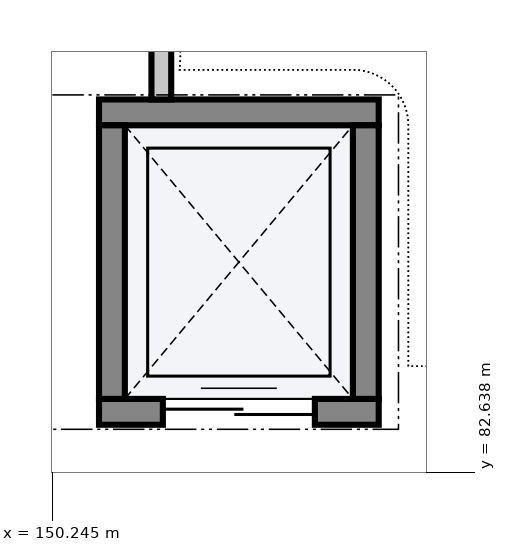
"""IFC4 building model, lengths in metres.
Left out: names, types, materials, properties, quantities, classifications, styles, units other than length and angle.
Written with IfcOpenShell. Run it as: python <this file> out.ifc"""

import sys

from ifc_helpers import new_model, si_unit, direction, frame, frame_2d, origin, place, context, subcontext, project, spatial, rectangle, extrude, element, fill, save


model = new_model("IFC4")
c1 = context("Model", 3, precision=1e-05, world=origin(), true_north=direction((0.0, 1.0)))
c2 = subcontext(c1, "Body", "Model", "MODEL_VIEW")
j1 = project(units=[si_unit("LENGTHUNIT", "METRE"), si_unit("PLANEANGLEUNIT", "RADIAN")], contexts=[c1])
p1 = place(None, origin())
s1 = spatial("IfcSite", under=j1, at=p1, CompositionType="ELEMENT")
p2 = place(p1, origin())
s2 = spatial("IfcBuilding", under=s1, at=p2, CompositionType="ELEMENT")
p3 = place(p2, origin())
s3 = spatial("IfcBuildingStorey", under=s2, at=p3, CompositionType="ELEMENT", Elevation=0.0)
p4 = place(p3, frame((150.86, 83.43, 0.0), z_axis=(0.0, 0.0, 1.0), x_axis=(1.0, 0.0, 0.0)))
e1 = element("IfcWall", 1, at=p4, inside=s3, PredefinedType="SHEAR", context=c2, shape_type="SweptSolid", body=[
    extrude(rectangle(XDim=3.68, YDim=0.34, at=frame_2d((1.84, 0.0))), origin(), (0.0, 0.0, 1.0), 5.09),
])
p5 = place(p4, frame((0.84, 0.0, 0.0)))
e2 = element("IfcOpeningElement", 2, at=p5, cuts=e1, PredefinedType="OPENING", context=c2, shape_type="SweptSolid", body=[
    extrude(rectangle(XDim=2.0, YDim=2.4, at=frame_2d((1.0, 1.2))), frame((0.0, 0.182, 0.0), z_axis=(0.0, -1.0, 0.0), x_axis=(1.0, 0.0, 0.0)), (0.0, 0.0, 1.0), 0.364),
])
p6 = place(p3, frame((150.86, 87.37, 0.0), z_axis=(0.0, 0.0, 1.0), x_axis=(1.0, 0.0, 0.0)))
e3 = element("IfcWall", 3, at=p6, inside=s3, PredefinedType="SHEAR", context=c2, shape_type="SweptSolid", body=[
    extrude(rectangle(XDim=3.68, YDim=0.34, at=frame_2d((1.84, 0.0))), origin(), (0.0, 0.0, 1.0), 5.09),
])
for number, where, z_axis, x_axis in (
    (4, (151.03, 83.6, 0.0), (0.0, 0.0, 1.0), (0.0, 1.0, 0.0)),
    (5, (154.37, 83.6, 0.0), (0.0, 0.0, 1.0), (0.0, 1.0, 0.0)),
):
    element("IfcWall", number, at=place(p3, frame(where, z_axis=z_axis, x_axis=x_axis)), inside=s3, PredefinedType="SHEAR", context=c2, shape_type="SweptSolid", body=[
        extrude(rectangle(XDim=3.6, YDim=0.34, at=frame_2d((1.8, 0.0))), origin(), (0.0, 0.0, 1.0), 5.09),
    ])
p7 = place(p3, frame((151.68, 87.54, 0.0), z_axis=(0.0, 0.0, 1.0), x_axis=(0.0, 1.0, 0.0)))
e6 = element("IfcWall", 6, at=p7, inside=s3, PredefinedType="PARTITIONING", context=c2, shape_type="SweptSolid", body=[
    extrude(rectangle(XDim=9.81, YDim=0.26, at=frame_2d((4.905, 0.0))), origin(), (0.0, 0.0, 1.0), 4.03),
])
p8 = place(p5, origin())
e7 = element("IfcDoor", 7, at=p8, inside=s3, OperationType="DOUBLE_DOOR_SLIDING", PredefinedType="DOOR", context=c2, shape_type="SweptSolid", body=[
    extrude(rectangle(XDim=2.0, YDim=2.4, at=frame_2d((1.0, 1.2))), frame((0.0, 0.025, 0.0), z_axis=(0.0, -1.0, 0.0), x_axis=(1.0, 0.0, 0.0)), (0.0, 0.0, 1.0), 0.05),
])
fill(e2, e7)
save(model, sys.argv[1])
